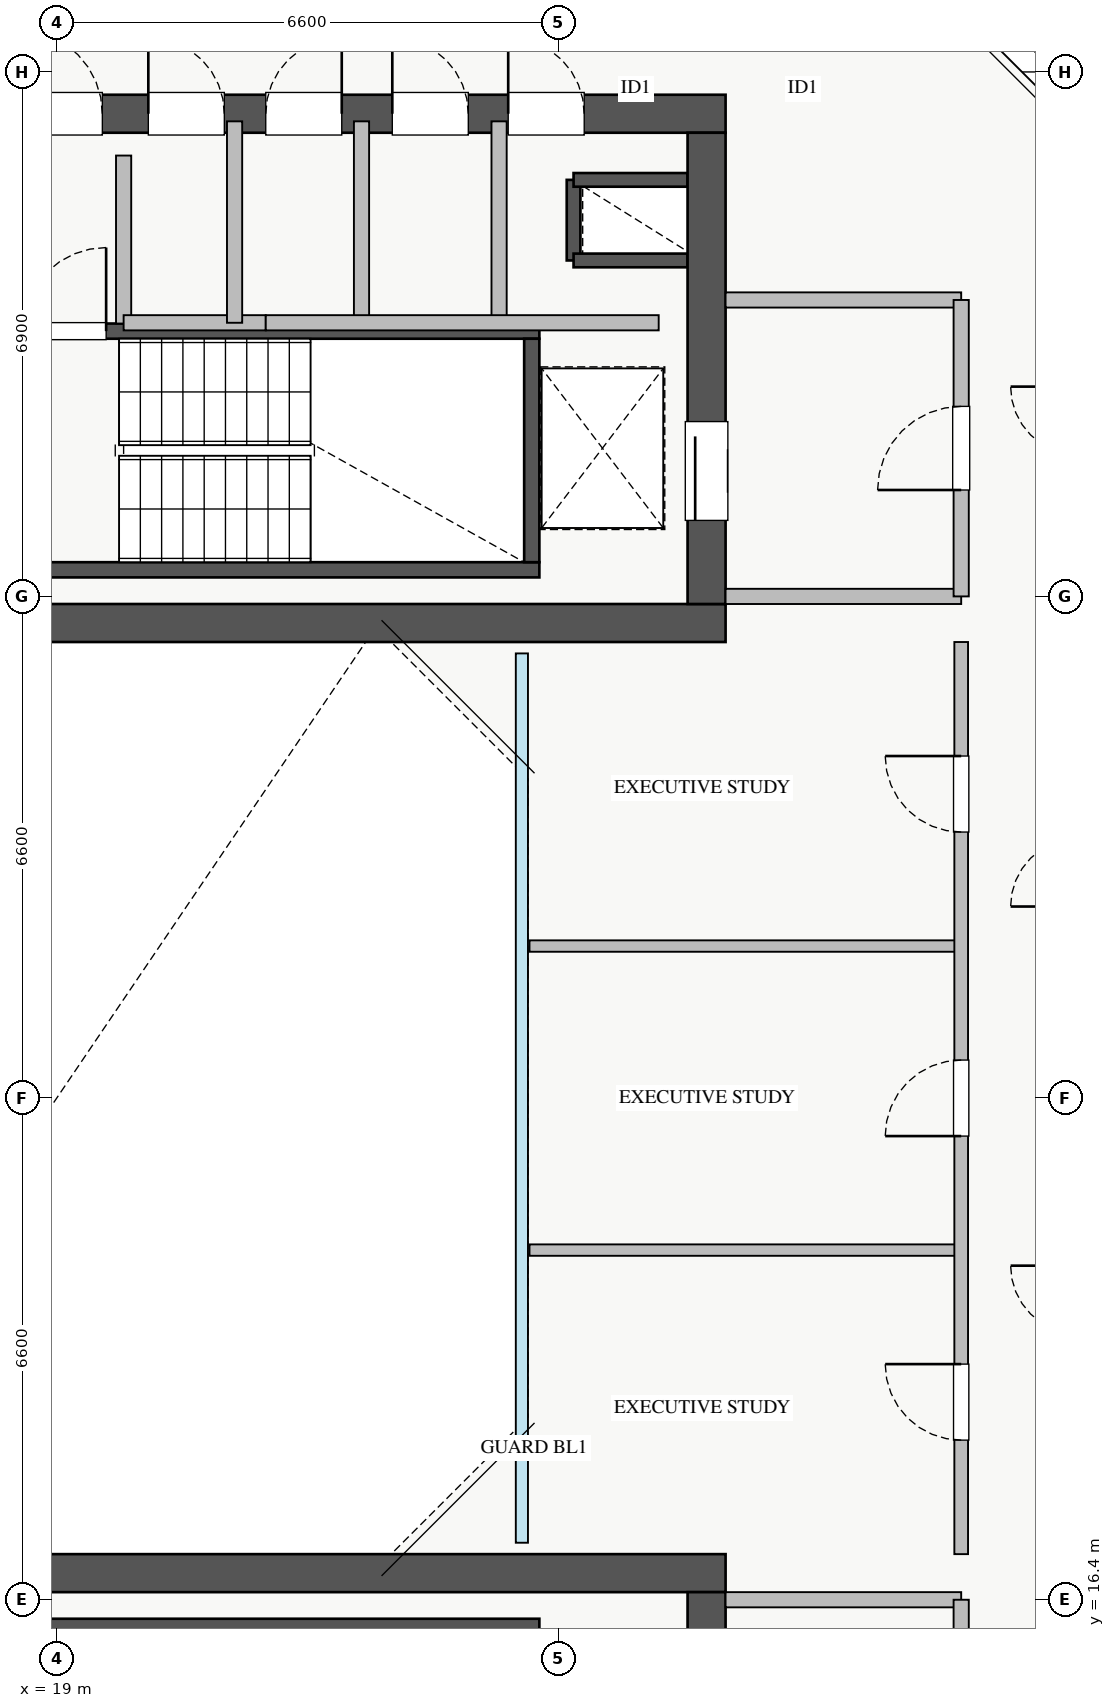
"""IFC4 building model, lengths in metres.
Left out: names, types, materials, properties, quantities, classifications, styles, units other than length and angle.
Written with IfcOpenShell. Run it as: python <this file> out.ifc"""

import sys

from ifc_helpers import new_model, si_unit, direction, frame, frame_2d, origin, place, context, subcontext, project, spatial, rectangle, extrude, source, transform, mapped, element, fill, save


model = new_model("IFC4")
c1 = context("Model", 3, precision=1e-05, world=origin(), true_north=direction((0.0, 1.0)))
c2 = subcontext(c1, "Body", "Model", "MODEL_VIEW")
j1 = project(units=[si_unit("LENGTHUNIT", "METRE"), si_unit("PLANEANGLEUNIT", "RADIAN")], contexts=[c1])
p1 = place(None, origin())
s1 = spatial("IfcSite", under=j1, at=p1, CompositionType="ELEMENT")
p2 = place(p1, origin())
s2 = spatial("IfcBuilding", under=s1, at=p2, CompositionType="ELEMENT")
p3 = place(p2, frame((0.0, 0.0, 213.25)))
s3 = spatial("IfcBuildingStorey", under=s2, at=p3, CompositionType="ELEMENT", Elevation=213.25)
p4 = place(p3, frame((25.8, 34.02, 0.0), z_axis=(0.0, 0.0, 1.0), x_axis=(0.0, 1.0, 0.0)))
e1 = element("IfcWall", 1, at=p4, inside=s3, PredefinedType="SHEAR", context=c2, shape_type="SweptSolid", body=[
    extrude(rectangle(XDim=1.06, YDim=0.18, at=frame_2d((0.53, 0.0))), origin(), (0.0, 0.0, 1.0), 3.07),
])
for number, where, z_axis, x_axis in (
    (2, (25.8, 35.08, 0.0), (0.0, 0.0, 1.0), (1.0, 0.0, 0.0)),
    (3, (25.8, 34.02, 0.0), (0.0, 0.0, 1.0), (1.0, 0.0, 0.0)),
):
    element("IfcWall", number, at=place(p3, frame(where, z_axis=z_axis, x_axis=x_axis)), inside=s3, PredefinedType="SHEAR", context=c2, shape_type="SweptSolid", body=[
        extrude(rectangle(XDim=1.5, YDim=0.18, at=frame_2d((0.75, 0.0))), origin(), (0.0, 0.0, 1.0), 3.07),
    ])
p5 = place(p3, frame((18.2, 29.95, 0.0), z_axis=(0.0, 0.0, 1.0), x_axis=(1.0, 0.0, 0.0)))
e4 = element("IfcWall", 4, at=p5, inside=s3, PredefinedType="SHEAR", context=c2, shape_type="SweptSolid", body=[
    extrude(rectangle(XDim=7.15, YDim=0.2, at=frame_2d((3.575, 0.0))), origin(), (0.0, 0.0, 1.0), 3.25),
])
p6 = place(p3, frame((18.2, 33.09, 0.0), z_axis=(0.0, 0.0, 1.0), x_axis=(1.0, 0.0, 0.0)))
e5 = element("IfcWall", 5, at=p6, inside=s3, PredefinedType="SHEAR", context=c2, shape_type="SweptSolid", body=[
    extrude(rectangle(XDim=7.15, YDim=0.2, at=frame_2d((3.575, 0.0))), origin(), (0.0, 0.0, 1.0), 3.25),
])
p7 = place(p6, frame((0.35, 0.0, 0.0)))
e6 = element("IfcOpeningElement", 6, at=p7, cuts=e5, PredefinedType="OPENING", context=c2, shape_type="SweptSolid", body=[
    extrude(rectangle(XDim=1.1, YDim=2.05, at=frame_2d((0.55, 1.025))), frame((0.0, 0.11, 0.0), z_axis=(0.0, -1.0, 0.0), x_axis=(1.0, 0.0, 0.0)), (0.0, 0.0, 1.0), 0.22),
])
p8 = place(p3, frame((25.25, 30.05, 0.0), z_axis=(0.0, 0.0, 1.0), x_axis=(0.0, 1.0, 0.0)))
e7 = element("IfcWall", 7, at=p8, inside=s3, PredefinedType="SHEAR", context=c2, shape_type="SweptSolid", body=[
    extrude(rectangle(XDim=2.94, YDim=0.2, at=frame_2d((1.47, 0.0))), origin(), (0.0, 0.0, 1.0), 3.25),
])
p9 = place(p3, frame((18.2, 16.05, 0.0), z_axis=(0.0, 0.0, 1.0), x_axis=(1.0, 0.0, 0.0)))
e8 = element("IfcWall", 8, at=p9, inside=s3, PredefinedType="SHEAR", context=c2, shape_type="SweptSolid", body=[
    extrude(rectangle(XDim=7.15, YDim=0.2, at=frame_2d((3.575, 0.0))), origin(), (0.0, 0.0, 1.0), 3.25),
])
p10 = place(p3, frame((10.2, 29.25, 0.0), z_axis=(0.0, 0.0, 1.0), x_axis=(1.0, 0.0, 0.0)))
e9 = element("IfcWall", 9, at=p10, inside=s3, PredefinedType="SHEAR", context=c2, shape_type="SweptSolid", body=[
    extrude(rectangle(XDim=17.6, YDim=0.5, at=frame_2d((8.8, 0.0))), origin(), (0.0, 0.0, 1.0), 3.25),
])
p11 = place(p3, frame((10.2, 35.95, 0.0), z_axis=(0.0, 0.0, 1.0), x_axis=(1.0, 0.0, 0.0)))
e10 = element("IfcWall", 10, at=p11, inside=s3, PredefinedType="SHEAR", context=c2, shape_type="SweptSolid", body=[
    extrude(rectangle(XDim=17.6, YDim=0.5, at=frame_2d((8.8, 0.0))), origin(), (0.0, 0.0, 1.0), 3.25),
])
p12 = place(p11, frame((1.15, 0.0, 0.0)))
e11 = element("IfcOpeningElement", 11, at=p12, cuts=e10, PredefinedType="OPENING", context=c2, shape_type="SweptSolid", body=[
    extrude(rectangle(XDim=1.1, YDim=2.05, at=frame_2d((0.55, 1.025))), frame((0.0, 0.26, 0.0), z_axis=(0.0, -1.0, 0.0), x_axis=(1.0, 0.0, 0.0)), (0.0, 0.0, 1.0), 0.52),
])
p13 = place(p11, frame((8.3, 0.0, 0.0)))
e12 = element("IfcOpeningElement", 12, at=p13, cuts=e10, PredefinedType="OPENING", context=c2, shape_type="SweptSolid", body=[
    extrude(rectangle(XDim=1.1, YDim=2.05, at=frame_2d((0.55, 1.025))), frame((0.0, 0.26, 0.0), z_axis=(0.0, -1.0, 0.0), x_axis=(1.0, 0.0, 0.0)), (0.0, 0.0, 1.0), 0.52),
])
p14 = place(p11, frame((2.85, 0.0, 0.0)))
e13 = element("IfcOpeningElement", 13, at=p14, cuts=e10, PredefinedType="OPENING", context=c2, shape_type="SweptSolid", body=[
    extrude(rectangle(XDim=1.1, YDim=2.05, at=frame_2d((0.55, 1.025))), frame((0.0, 0.26, 0.0), z_axis=(0.0, -1.0, 0.0), x_axis=(1.0, 0.0, 0.0)), (0.0, 0.0, 1.0), 0.52),
])
p15 = place(p11, frame((5.8, 0.0, 0.0)))
e14 = element("IfcOpeningElement", 14, at=p15, cuts=e10, PredefinedType="OPENING", context=c2, shape_type="SweptSolid", body=[
    extrude(rectangle(XDim=1.0, YDim=2.05, at=frame_2d((0.5, 1.025))), frame((0.0, 0.26, 0.0), z_axis=(0.0, -1.0, 0.0), x_axis=(1.0, 0.0, 0.0)), (0.0, 0.0, 1.0), 0.52),
])
p16 = place(p11, frame((14.74, 0.0, 0.0)))
e15 = element("IfcOpeningElement", 15, at=p16, cuts=e10, PredefinedType="OPENING", context=c2, shape_type="SweptSolid", body=[
    extrude(rectangle(XDim=1.0, YDim=2.05, at=frame_2d((0.5, 1.025))), frame((0.0, 0.26, 0.0), z_axis=(0.0, -1.0, 0.0), x_axis=(1.0, 0.0, 0.0)), (0.0, 0.0, 1.0), 0.52),
])
p17 = place(p11, frame((10.005, 0.0, 0.0)))
e16 = element("IfcOpeningElement", 16, at=p17, cuts=e10, PredefinedType="OPENING", context=c2, shape_type="SweptSolid", body=[
    extrude(rectangle(XDim=1.0, YDim=2.05, at=frame_2d((0.5, 1.025))), frame((0.0, 0.26, 0.0), z_axis=(0.0, -1.0, 0.0), x_axis=(1.0, 0.0, 0.0)), (0.0, 0.0, 1.0), 0.52),
])
p18 = place(p11, frame((11.55, 0.0, 0.0)))
e17 = element("IfcOpeningElement", 17, at=p18, cuts=e10, PredefinedType="OPENING", context=c2, shape_type="SweptSolid", body=[
    extrude(rectangle(XDim=1.0, YDim=2.05, at=frame_2d((0.5, 1.025))), frame((0.0, 0.26, 0.0), z_axis=(0.0, -1.0, 0.0), x_axis=(1.0, 0.0, 0.0)), (0.0, 0.0, 1.0), 0.52),
])
p19 = place(p11, frame((13.215, 0.0, 0.0)))
e18 = element("IfcOpeningElement", 18, at=p19, cuts=e10, PredefinedType="OPENING", context=c2, shape_type="SweptSolid", body=[
    extrude(rectangle(XDim=1.0, YDim=2.05, at=frame_2d((0.5, 1.025))), frame((0.0, 0.26, 0.0), z_axis=(0.0, -1.0, 0.0), x_axis=(1.0, 0.0, 0.0)), (0.0, 0.0, 1.0), 0.52),
])
p20 = place(p3, frame((27.55, 29.5, 0.0), z_axis=(0.0, 0.0, 1.0), x_axis=(0.0, 1.0, 0.0)))
e19 = element("IfcWall", 19, at=p20, inside=s3, PredefinedType="SHEAR", context=c2, shape_type="SweptSolid", body=[
    extrude(rectangle(XDim=6.2, YDim=0.5, at=frame_2d((3.1, 0.0))), origin(), (0.0, 0.0, 1.0), 3.25),
])
p21 = place(p20, frame((1.1, 0.0, 0.0)))
e20 = element("IfcOpeningElement", 20, at=p21, cuts=e19, PredefinedType="OPENING", context=c2, shape_type="SweptSolid", body=[
    extrude(rectangle(XDim=1.3, YDim=2.05, at=frame_2d((0.65, 1.025))), frame((0.0, 0.26, 0.0), z_axis=(0.0, -1.0, 0.0), x_axis=(1.0, 0.0, 0.0)), (0.0, 0.0, 1.0), 0.52),
])
p22 = place(p3, frame((10.2, 16.75, 0.0), z_axis=(0.0, 0.0, 1.0), x_axis=(1.0, 0.0, 0.0)))
e21 = element("IfcWall", 21, at=p22, inside=s3, PredefinedType="SHEAR", context=c2, shape_type="SweptSolid", body=[
    extrude(rectangle(XDim=17.6, YDim=0.5, at=frame_2d((8.8, 0.0))), origin(), (0.0, 0.0, 1.0), 3.25),
])
p23 = place(p3, frame((27.55, 10.3, 0.0), z_axis=(0.0, 0.0, 1.0), x_axis=(0.0, 1.0, 0.0)))
e22 = element("IfcWall", 22, at=p23, inside=s3, PredefinedType="SHEAR", context=c2, shape_type="SweptSolid", body=[
    extrude(rectangle(XDim=6.2, YDim=0.5, at=frame_2d((3.1, 0.0))), origin(), (0.0, 0.0, 1.0), 3.25),
])
p24 = place(p23, frame((2.1, 0.0, 0.0)))
e23 = element("IfcOpeningElement", 23, at=p24, cuts=e22, PredefinedType="OPENING", context=c2, shape_type="SweptSolid", body=[
    extrude(rectangle(XDim=1.3, YDim=2.05, at=frame_2d((0.65, 1.025))), frame((0.0, 0.26, 0.0), z_axis=(0.0, -1.0, 0.0), x_axis=(1.0, 0.0, 0.0)), (0.0, 0.0, 1.0), 0.52),
])
p25 = place(p3, frame((27.8, 29.6, 0.0), z_axis=(0.0, 0.0, 1.0), x_axis=(1.0, 0.0, 0.0)))
e24 = element("IfcWall", 24, at=p25, inside=s3, PredefinedType="PARTITIONING", context=c2, shape_type="SweptSolid", body=[
    extrude(rectangle(XDim=3.1, YDim=0.2, at=frame_2d((1.55, 0.0))), origin(), (0.0, 0.0, 1.0), 3.07),
])
p26 = place(p3, frame((27.8, 33.5, 0.0), z_axis=(0.0, 0.0, 1.0), x_axis=(1.0, 0.0, 0.0)))
e25 = element("IfcWall", 25, at=p26, inside=s3, PredefinedType="PARTITIONING", context=c2, shape_type="SweptSolid", body=[
    extrude(rectangle(XDim=3.1, YDim=0.2, at=frame_2d((1.55, 0.0))), origin(), (0.0, 0.0, 1.0), 2.265),
])
p27 = place(p3, frame((30.9, 29.6, 0.0), z_axis=(0.0, 0.0, 1.0), x_axis=(0.0, 1.0, 0.0)))
e26 = element("IfcWall", 26, at=p27, inside=s3, PredefinedType="PARTITIONING", context=c2, shape_type="SweptSolid", body=[
    extrude(rectangle(XDim=3.9, YDim=0.2, at=frame_2d((1.95, 0.0))), origin(), (0.0, 0.0, 1.0), 3.07),
])
p28 = place(p27, frame((1.4, 0.0, 0.0)))
e27 = element("IfcOpeningElement", 27, at=p28, cuts=e26, PredefinedType="OPENING", context=c2, shape_type="SweptSolid", body=[
    extrude(rectangle(XDim=1.1, YDim=2.05, at=frame_2d((0.55, 1.025))), frame((0.0, 0.11, 0.0), z_axis=(0.0, -1.0, 0.0), x_axis=(1.0, 0.0, 0.0)), (0.0, 0.0, 1.0), 0.22),
])
p29 = place(p3, frame((27.8, 16.4, 0.0), z_axis=(0.0, 0.0, 1.0), x_axis=(1.0, 0.0, 0.0)))
e28 = element("IfcWall", 28, at=p29, inside=s3, PredefinedType="PARTITIONING", context=c2, shape_type="SweptSolid", body=[
    extrude(rectangle(XDim=3.1, YDim=0.2, at=frame_2d((1.55, 0.0))), origin(), (0.0, 0.0, 1.0), 3.07),
])
p30 = place(p3, frame((30.9, 12.5, 0.0), z_axis=(0.0, 0.0, 1.0), x_axis=(0.0, 1.0, 0.0)))
e29 = element("IfcWall", 29, at=p30, inside=s3, PredefinedType="PARTITIONING", context=c2, shape_type="SweptSolid", body=[
    extrude(rectangle(XDim=3.9, YDim=0.2, at=frame_2d((1.95, 0.0))), origin(), (0.0, 0.0, 1.0), 3.07),
])
p31 = place(p30, frame((1.4, 0.0, 0.0)))
e30 = element("IfcOpeningElement", 30, at=p31, cuts=e29, PredefinedType="OPENING", context=c2, shape_type="SweptSolid", body=[
    extrude(rectangle(XDim=1.1, YDim=2.05, at=frame_2d((0.55, 1.025))), frame((0.0, 0.11, 0.0), z_axis=(0.0, -1.0, 0.0), x_axis=(1.0, 0.0, 0.0)), (0.0, 0.0, 1.0), 0.22),
])
p32 = place(p3, frame((19.88, 33.19, 0.0), z_axis=(0.0, 0.0, 1.0), x_axis=(0.0, 1.0, 0.0)))
e31 = element("IfcWall", 31, at=p32, inside=s3, PredefinedType="PARTITIONING", context=c2, shape_type="SweptSolid", body=[
    extrude(rectangle(XDim=2.21, YDim=0.2, at=frame_2d((1.105, 0.0))), origin(), (0.0, 0.0, 1.0), 3.07),
])
p33 = place(p3, frame((24.82, 33.2, 0.0), z_axis=(0.0, 0.0, 1.0), x_axis=(0.0, 1.0, 0.0)))
e32 = element("IfcWall", 32, at=p33, inside=s3, PredefinedType="PARTITIONING", context=c2, shape_type="SweptSolid", body=[
    extrude(rectangle(XDim=2.65, YDim=0.2, at=frame_2d((1.325, 0.0))), origin(), (0.0, 0.0, 1.0), 3.07),
])
p34 = place(p3, frame((19.88, 33.2, 0.0), z_axis=(0.0, 0.0, 1.0), x_axis=(1.0, 0.0, 0.0)))
e33 = element("IfcWall", 33, at=p34, inside=s3, PredefinedType="PARTITIONING", context=c2, shape_type="SweptSolid", body=[
    extrude(rectangle(XDim=1.87, YDim=0.2, at=frame_2d((0.935, 0.0))), origin(), (0.0, 0.0, 1.0), 3.07),
])
for number, where, z_axis, x_axis in (
    (34, (21.34, 33.2, 0.0), (0.0, 0.0, 1.0), (0.0, 1.0, 0.0)),
    (35, (23.01, 33.2, 0.0), (0.0, 0.0, 1.0), (0.0, 1.0, 0.0)),
):
    element("IfcWall", number, at=place(p3, frame(where, z_axis=z_axis, x_axis=x_axis)), inside=s3, PredefinedType="PARTITIONING", context=c2, shape_type="SweptSolid", body=[
        extrude(rectangle(XDim=2.65, YDim=0.2, at=frame_2d((1.325, 0.0))), origin(), (0.0, 0.0, 1.0), 3.07),
    ])
p35 = place(p3, frame((21.75, 33.2, 0.0), z_axis=(0.0, 0.0, 1.0), x_axis=(1.0, 0.0, 0.0)))
e36 = element("IfcWall", 36, at=p35, inside=s3, PredefinedType="PARTITIONING", context=c2, shape_type="SweptSolid", body=[
    extrude(rectangle(XDim=5.17, YDim=0.2, at=frame_2d((2.585, 0.0))), origin(), (0.0, 0.0, 1.0), 3.07),
])
for number, where, z_axis, x_axis in (
    (37, (25.22, 21.0, 0.0), (0.0, 0.0, 1.0), (1.0, 0.0, 0.0)),
    (38, (25.22, 25.0, 0.0), (0.0, 0.0, 1.0), (1.0, 0.0, 0.0)),
):
    element("IfcWall", number, at=place(p3, frame(where, z_axis=z_axis, x_axis=x_axis)), inside=s3, PredefinedType="PARTITIONING", context=c2, shape_type="SweptSolid", body=[
        extrude(rectangle(XDim=5.68, YDim=0.15, at=frame_2d((2.84, 0.0))), origin(), (0.0, 0.0, 1.0), 3.07),
    ])
p36 = place(p3, frame((30.9, 17.0, 0.0), z_axis=(0.0, 0.0, 1.0), x_axis=(0.0, 1.0, 0.0)))
e39 = element("IfcWall", 39, at=p36, inside=s3, PredefinedType="PARTITIONING", context=c2, shape_type="SweptSolid", body=[
    extrude(rectangle(XDim=12.0, YDim=0.18, at=frame_2d((6.0, 0.0))), origin(), (0.0, 0.0, 1.0), 3.07),
])
p37 = place(p36, frame((1.5, 0.0, 0.0)))
e40 = element("IfcOpeningElement", 40, at=p37, cuts=e39, PredefinedType="OPENING", context=c2, shape_type="SweptSolid", body=[
    extrude(rectangle(XDim=1.0, YDim=2.05, at=frame_2d((0.5, 1.025))), frame((0.0, 0.1, 0.0), z_axis=(0.0, -1.0, 0.0), x_axis=(1.0, 0.0, 0.0)), (0.0, 0.0, 1.0), 0.2),
])
p38 = place(p36, frame((5.5, 0.0, 0.0)))
e41 = element("IfcOpeningElement", 41, at=p38, cuts=e39, PredefinedType="OPENING", context=c2, shape_type="SweptSolid", body=[
    extrude(rectangle(XDim=1.0, YDim=2.05, at=frame_2d((0.5, 1.025))), frame((0.0, 0.1, 0.0), z_axis=(0.0, -1.0, 0.0), x_axis=(1.0, 0.0, 0.0)), (0.0, 0.0, 1.0), 0.2),
])
p39 = place(p36, frame((9.5, 0.0, 0.0)))
e42 = element("IfcOpeningElement", 42, at=p39, cuts=e39, PredefinedType="OPENING", context=c2, shape_type="SweptSolid", body=[
    extrude(rectangle(XDim=1.0, YDim=2.05, at=frame_2d((0.5, 1.025))), frame((0.0, 0.1, 0.0), z_axis=(0.0, -1.0, 0.0), x_axis=(1.0, 0.0, 0.0)), (0.0, 0.0, 1.0), 0.2),
])
m1 = source(origin(), c2, "Body", "SweptSolid", [
    extrude(rectangle(XDim=1.3, YDim=2.05, at=frame_2d((0.65, 1.025))), frame((0.0, 0.025, 0.0), z_axis=(0.0, -1.0, 0.0), x_axis=(1.0, 0.0, 0.0)), (0.0, 0.0, 1.0), 0.05),
])
p40 = place(p21, origin())
e43 = element("IfcDoor", 43, at=p40, inside=s3, OperationType="SLIDING_TO_LEFT", PredefinedType="DOOR", context=c2, shape_type="MappedRepresentation", body=[
    mapped(m1, transform((0.0, 0.0, 0.0), x_axis=(1.0, 0.0, 0.0), y_axis=(0.0, 1.0, 0.0), z_axis=(0.0, 0.0, 1.0), scale=1.0)),
])
fill(e20, e43)
m2 = source(origin(), c2, "Body", "SweptSolid", [
    extrude(rectangle(XDim=1.1, YDim=2.05, at=frame_2d((0.55, 1.025))), frame((0.0, 0.025, 0.0), z_axis=(0.0, -1.0, 0.0), x_axis=(1.0, 0.0, 0.0)), (0.0, 0.0, 1.0), 0.05),
])
p41 = place(p13, origin())
e44 = element("IfcDoor", 44, at=p41, inside=s3, OperationType="SINGLE_SWING_LEFT", PredefinedType="DOOR", context=c2, shape_type="MappedRepresentation", body=[
    mapped(m2, transform((0.0, 0.0, 0.0), x_axis=(1.0, 0.0, 0.0), y_axis=(0.0, 1.0, 0.0), z_axis=(0.0, 0.0, 1.0), scale=1.0)),
])
fill(e12, e44)
p42 = place(p7, origin())
e45 = element("IfcDoor", 45, at=p42, inside=s3, OperationType="SINGLE_SWING_RIGHT", PredefinedType="DOOR", context=c2, shape_type="MappedRepresentation", body=[
    mapped(m2, transform((0.0, 0.0, 0.0), x_axis=(1.0, 0.0, 0.0), y_axis=(0.0, 1.0, 0.0), z_axis=(0.0, 0.0, 1.0), scale=1.0)),
])
fill(e6, e45)
m3 = source(origin(), c2, "Body", "SweptSolid", [
    extrude(rectangle(XDim=1.0, YDim=2.05, at=frame_2d((0.5, 1.025))), frame((0.0, 0.025, 0.0), z_axis=(0.0, -1.0, 0.0), x_axis=(1.0, 0.0, 0.0)), (0.0, 0.0, 1.0), 0.05),
])
p43 = place(p16, origin())
e46 = element("IfcDoor", 46, at=p43, inside=s3, OperationType="SINGLE_SWING_LEFT", PredefinedType="DOOR", context=c2, shape_type="MappedRepresentation", body=[
    mapped(m3, transform((0.0, 0.0, 0.0), x_axis=(1.0, 0.0, 0.0), y_axis=(0.0, 1.0, 0.0), z_axis=(0.0, 0.0, 1.0), scale=1.0)),
])
fill(e15, e46)
p44 = place(p17, origin())
e47 = element("IfcDoor", 47, at=p44, inside=s3, OperationType="SINGLE_SWING_LEFT", PredefinedType="DOOR", context=c2, shape_type="MappedRepresentation", body=[
    mapped(m3, transform((0.0, 0.0, 0.0), x_axis=(1.0, 0.0, 0.0), y_axis=(0.0, 1.0, 0.0), z_axis=(0.0, 0.0, 1.0), scale=1.0)),
])
fill(e16, e47)
p45 = place(p18, origin())
e48 = element("IfcDoor", 48, at=p45, inside=s3, OperationType="SINGLE_SWING_RIGHT", PredefinedType="DOOR", context=c2, shape_type="MappedRepresentation", body=[
    mapped(m3, transform((0.0, 0.0, 0.0), x_axis=(1.0, 0.0, 0.0), y_axis=(0.0, 1.0, 0.0), z_axis=(0.0, 0.0, 1.0), scale=1.0)),
])
fill(e17, e48)
p46 = place(p19, origin())
e49 = element("IfcDoor", 49, at=p46, inside=s3, OperationType="SINGLE_SWING_LEFT", PredefinedType="DOOR", context=c2, shape_type="MappedRepresentation", body=[
    mapped(m3, transform((0.0, 0.0, 0.0), x_axis=(1.0, 0.0, 0.0), y_axis=(0.0, 1.0, 0.0), z_axis=(0.0, 0.0, 1.0), scale=1.0)),
])
fill(e18, e49)
p47 = place(p28, origin())
e50 = element("IfcDoor", 50, at=p47, inside=s3, OperationType="SINGLE_SWING_LEFT", PredefinedType="DOOR", context=c2, shape_type="MappedRepresentation", body=[
    mapped(m2, transform((0.0, 0.0, 0.0), x_axis=(1.0, 0.0, 0.0), y_axis=(0.0, 1.0, 0.0), z_axis=(0.0, 0.0, 1.0), scale=1.0)),
])
fill(e27, e50)
p48 = place(p37, origin())
e51 = element("IfcDoor", 51, at=p48, inside=s3, OperationType="SINGLE_SWING_RIGHT", PredefinedType="DOOR", context=c2, shape_type="MappedRepresentation", body=[
    mapped(m3, transform((0.0, 0.0, 0.0), x_axis=(1.0, 0.0, 0.0), y_axis=(0.0, 1.0, 0.0), z_axis=(0.0, 0.0, 1.0), scale=1.0)),
])
fill(e40, e51)
p49 = place(p38, origin())
e52 = element("IfcDoor", 52, at=p49, inside=s3, OperationType="SINGLE_SWING_LEFT", PredefinedType="DOOR", context=c2, shape_type="MappedRepresentation", body=[
    mapped(m3, transform((0.0, 0.0, 0.0), x_axis=(1.0, 0.0, 0.0), y_axis=(0.0, 1.0, 0.0), z_axis=(0.0, 0.0, 1.0), scale=1.0)),
])
fill(e41, e52)
p50 = place(p39, origin())
e53 = element("IfcDoor", 53, at=p50, inside=s3, OperationType="SINGLE_SWING_RIGHT", PredefinedType="DOOR", context=c2, shape_type="MappedRepresentation", body=[
    mapped(m3, transform((0.0, 0.0, 0.0), x_axis=(1.0, 0.0, 0.0), y_axis=(0.0, 1.0, 0.0), z_axis=(0.0, 0.0, 1.0), scale=1.0)),
])
fill(e42, e53)
save(model, sys.argv[1])
